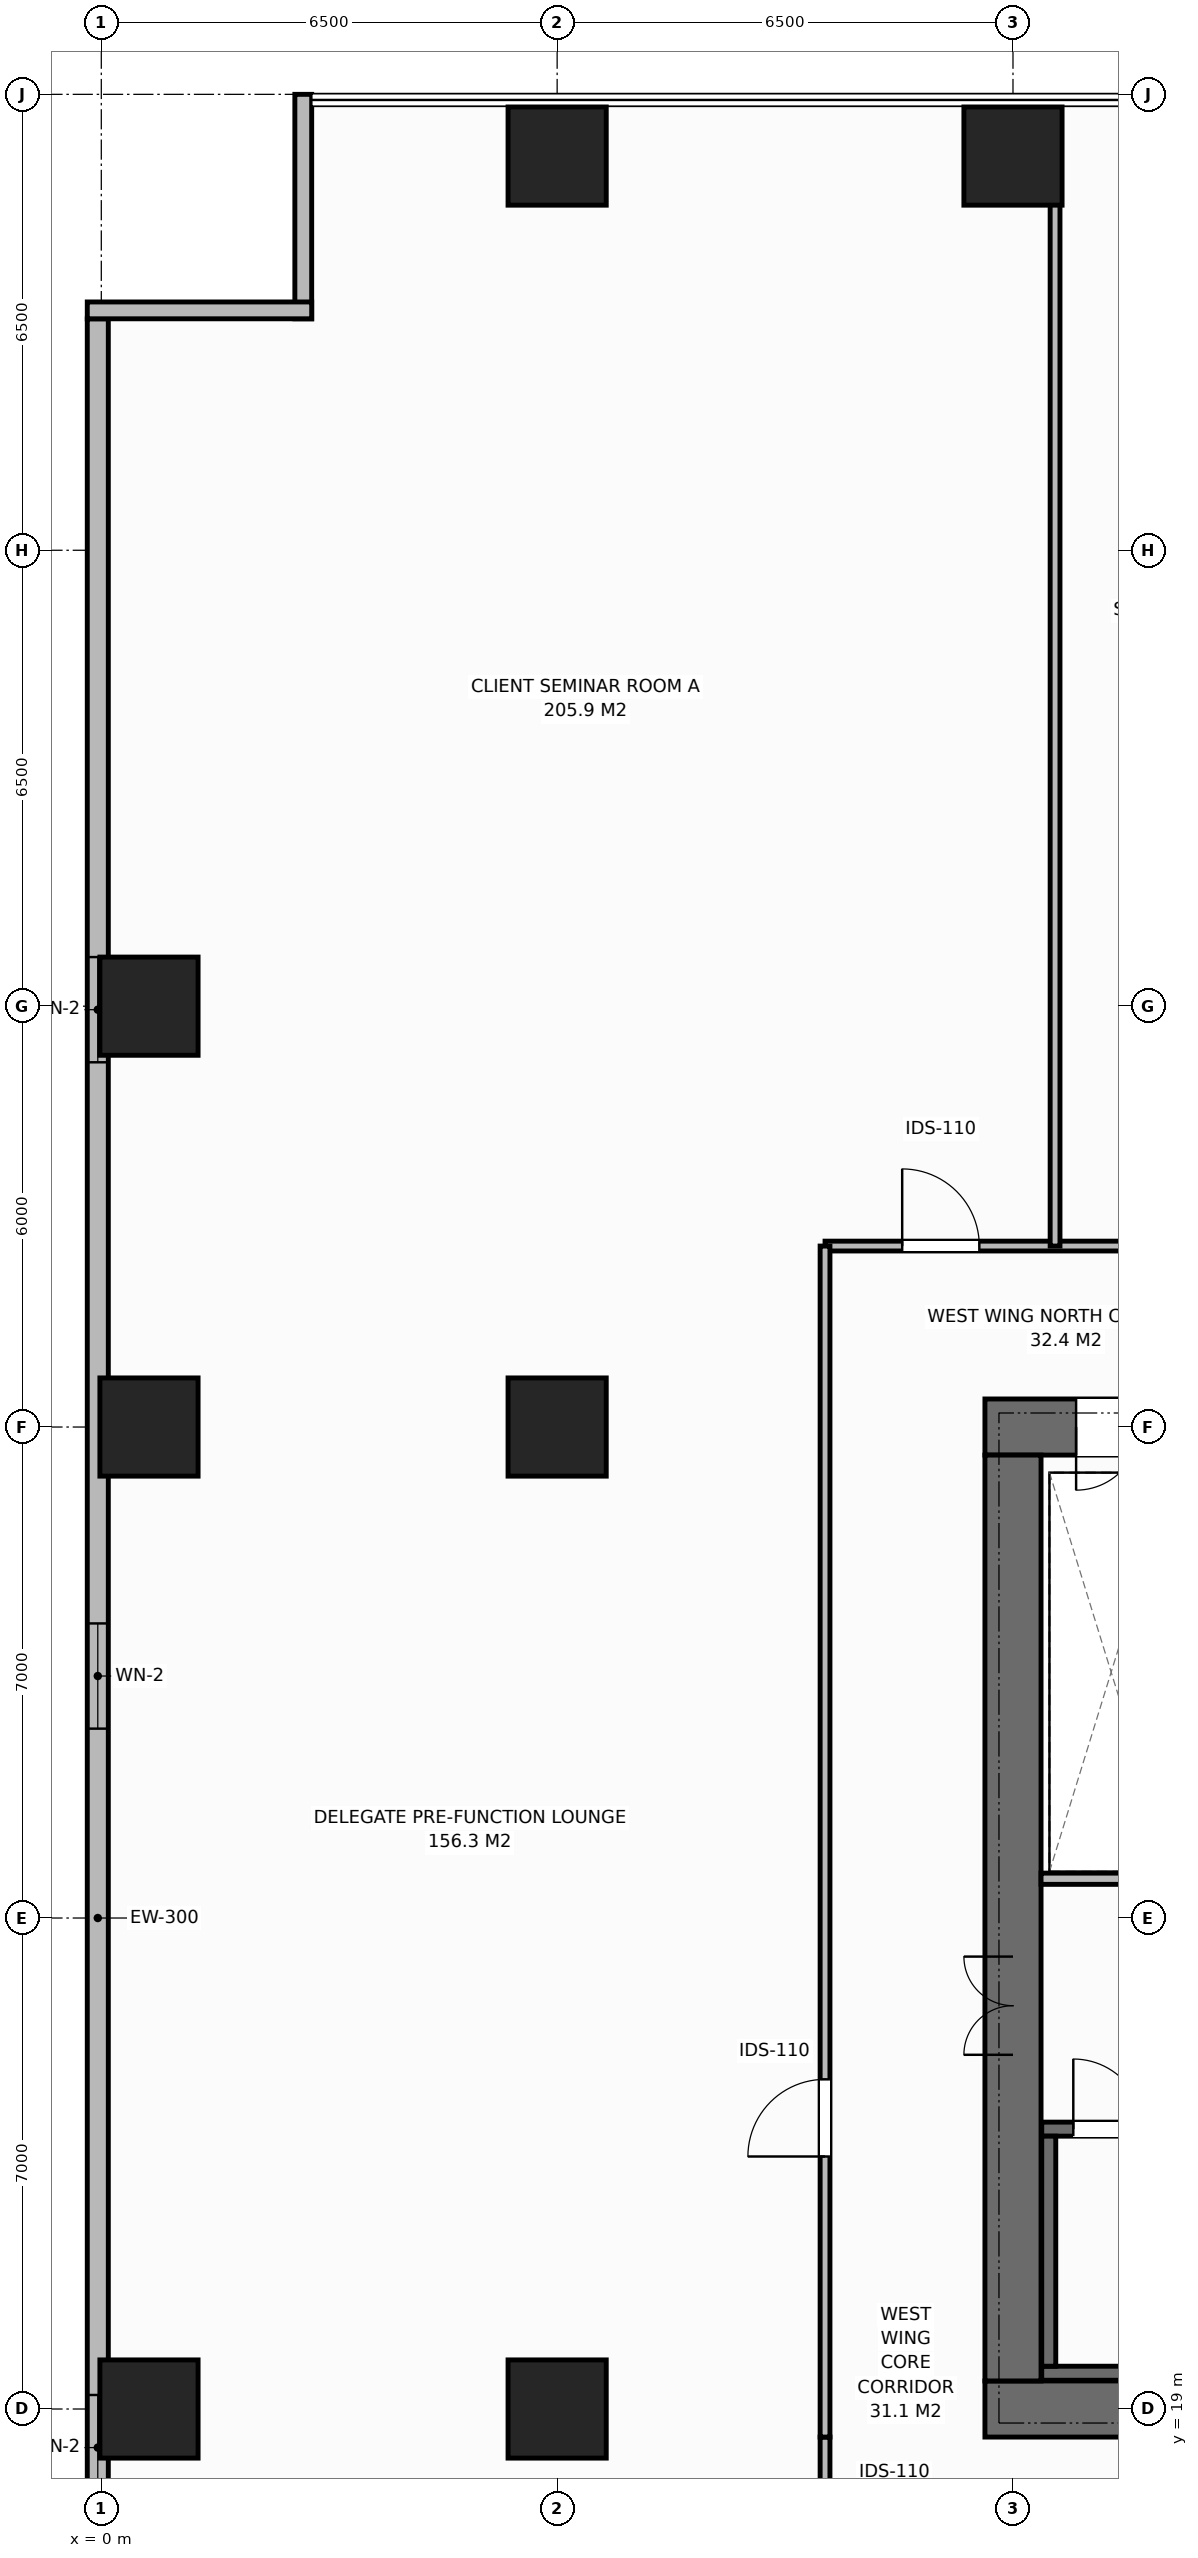
"""IFC4 building model, lengths in metres.
Left out: names, types, materials, properties, quantities, classifications, styles, units other than length and angle.
Written with IfcOpenShell. Run it as: python <this file> out.ifc"""

import sys

from ifc_helpers import new_model, si_unit, direction, frame, frame_2d, origin, origin_2d, place, context, subcontext, project, spatial, rectangle, extrude, element, fill, save


model = new_model("IFC4")
c1 = context("Model", 3, precision=1e-05, world=origin(), true_north=direction((0.0, 1.0)))
c2 = subcontext(c1, "Body", "Model", "MODEL_VIEW")
j1 = project(units=[si_unit("LENGTHUNIT", "METRE"), si_unit("PLANEANGLEUNIT", "RADIAN")], contexts=[c1])
p1 = place(None, origin())
s1 = spatial("IfcSite", under=j1, at=p1, CompositionType="ELEMENT")
p2 = place(p1, origin())
s2 = spatial("IfcBuilding", under=s1, at=p2, CompositionType="ELEMENT")
p3 = place(p2, frame((0.0, 0.0, 6.0)))
s3 = spatial("IfcBuildingStorey", under=s2, at=p3, CompositionType="ELEMENT", Elevation=6.0)
p4 = place(p3, frame((12.6, 19.0, 0.0), z_axis=(0.0, 0.0, 1.0), x_axis=(1.0, 0.0, 0.0)))
e1 = element("IfcWall", 1, at=p4, inside=s3, PredefinedType="SHEAR", context=c2, shape_type="SweptSolid", body=[
    extrude(rectangle(XDim=13.8, YDim=0.8, at=frame_2d((6.9, 0.0))), origin(), (0.0, 0.0, 1.0), 5.5),
])
p5 = place(p4, frame((9.28, 0.0, 0.0)))
e2 = element("IfcOpeningElement", 2, at=p5, cuts=e1, PredefinedType="OPENING", context=c2, shape_type="SweptSolid", body=[
    extrude(rectangle(XDim=1.4, YDim=2.2, at=frame_2d((0.7, 1.1))), frame((0.0, 0.41, 0.0), z_axis=(0.0, -1.0, 0.0), x_axis=(1.0, 0.0, 0.0)), (0.0, 0.0, 1.0), 0.82),
])
p6 = place(p3, frame((12.6, 33.0, 0.0), z_axis=(0.0, 0.0, 1.0), x_axis=(1.0, 0.0, 0.0)))
e3 = element("IfcWall", 3, at=p6, inside=s3, PredefinedType="SHEAR", context=c2, shape_type="SweptSolid", body=[
    extrude(rectangle(XDim=13.8, YDim=0.8, at=frame_2d((6.9, 0.0))), origin(), (0.0, 0.0, 1.0), 5.5),
])
p7 = place(p6, frame((1.3, 0.0, 0.0)))
e4 = element("IfcOpeningElement", 4, at=p7, cuts=e3, PredefinedType="OPENING", context=c2, shape_type="SweptSolid", body=[
    extrude(rectangle(XDim=0.9, YDim=2.15, at=frame_2d((0.45, 1.075))), frame((0.0, 0.41, 0.0), z_axis=(0.0, -1.0, 0.0), x_axis=(1.0, 0.0, 0.0)), (0.0, 0.0, 1.0), 0.82),
])
p8 = place(p6, frame((3.35, 0.0, 0.0)))
e5 = element("IfcOpeningElement", 5, at=p8, cuts=e3, PredefinedType="OPENING", context=c2, shape_type="SweptSolid", body=[
    extrude(rectangle(XDim=0.95, YDim=2.15, at=frame_2d((0.475, 1.075))), frame((0.0, 0.41, 0.0), z_axis=(0.0, -1.0, 0.0), x_axis=(1.0, 0.0, 0.0)), (0.0, 0.0, 1.0), 0.82),
])
p9 = place(p6, frame((6.2, 0.0, 0.0)))
e6 = element("IfcOpeningElement", 6, at=p9, cuts=e3, PredefinedType="OPENING", context=c2, shape_type="SweptSolid", body=[
    extrude(rectangle(XDim=0.95, YDim=2.15, at=frame_2d((0.475, 1.075))), frame((0.0, 0.41, 0.0), z_axis=(0.0, -1.0, 0.0), x_axis=(1.0, 0.0, 0.0)), (0.0, 0.0, 1.0), 0.82),
])
p10 = place(p6, frame((9.28, 0.0, 0.0)))
e7 = element("IfcOpeningElement", 7, at=p10, cuts=e3, PredefinedType="OPENING", context=c2, shape_type="SweptSolid", body=[
    extrude(rectangle(XDim=1.4, YDim=2.2, at=frame_2d((0.7, 1.1))), frame((0.0, 0.41, 0.0), z_axis=(0.0, -1.0, 0.0), x_axis=(1.0, 0.0, 0.0)), (0.0, 0.0, 1.0), 0.82),
])
p11 = place(p3, frame((13.0, 19.4, 0.0), z_axis=(0.0, 0.0, 1.0), x_axis=(0.0, 1.0, 0.0)))
e8 = element("IfcWall", 8, at=p11, inside=s3, PredefinedType="SHEAR", context=c2, shape_type="SweptSolid", body=[
    extrude(rectangle(XDim=13.2, YDim=0.8, at=frame_2d((6.6, 0.0))), origin(), (0.0, 0.0, 1.0), 5.5),
])
p12 = place(p11, frame((4.65, 0.0, 0.0)))
e9 = element("IfcOpeningElement", 9, at=p12, cuts=e8, PredefinedType="OPENING", context=c2, shape_type="SweptSolid", body=[
    extrude(rectangle(XDim=1.4, YDim=2.2, at=frame_2d((0.7, 1.1))), frame((0.0, 0.41, 0.0), z_axis=(0.0, -1.0, 0.0), x_axis=(1.0, 0.0, 0.0)), (0.0, 0.0, 1.0), 0.82),
])
p13 = place(p3, frame((13.41, 19.51, 0.0), z_axis=(0.0, 0.0, 1.0), x_axis=(1.0, 0.0, 0.0)))
e10 = element("IfcWall", 10, at=p13, inside=s3, PredefinedType="SHEAR", context=c2, shape_type="SweptSolid", body=[
    extrude(rectangle(XDim=8.43, YDim=0.2, at=frame_2d((4.215, 0.0))), origin(), (0.0, 0.0, 1.0), 5.5),
])
p14 = place(p3, frame((13.41, 22.99, 0.0), z_axis=(0.0, 0.0, 1.0), x_axis=(1.0, 0.0, 0.0)))
e11 = element("IfcWall", 11, at=p14, inside=s3, PredefinedType="SHEAR", context=c2, shape_type="SweptSolid", body=[
    extrude(rectangle(XDim=8.43, YDim=0.2, at=frame_2d((4.215, 0.0))), origin(), (0.0, 0.0, 1.0), 5.5),
])
p15 = place(p14, frame((0.45, 0.0, 0.0)))
e12 = element("IfcOpeningElement", 12, at=p15, cuts=e11, PredefinedType="OPENING", context=c2, shape_type="SweptSolid", body=[
    extrude(rectangle(XDim=1.0, YDim=2.15, at=frame_2d((0.5, 1.075))), frame((0.0, 0.11, 0.0), z_axis=(0.0, -1.0, 0.0), x_axis=(1.0, 0.0, 0.0)), (0.0, 0.0, 1.0), 0.22),
])
p16 = place(p3, frame((13.51, 19.61, 0.0), z_axis=(0.0, 0.0, 1.0), x_axis=(0.0, 1.0, 0.0)))
e13 = element("IfcWall", 13, at=p16, inside=s3, PredefinedType="SHEAR", context=c2, shape_type="SweptSolid", body=[
    extrude(rectangle(XDim=3.28, YDim=0.2, at=frame_2d((1.64, 0.0))), origin(), (0.0, 0.0, 1.0), 5.5),
])
for number, where, z_axis, x_axis in (
    (14, (6.5, 19.0, 0.0), (0.0, 0.0, 1.0), (1.0, 0.0, 0.0)),
    (15, (6.5, 33.0, 0.0), (0.0, 0.0, 1.0), (1.0, 0.0, 0.0)),
    (16, (6.5, 51.12, 0.0), (0.0, 0.0, 1.0), (1.0, 0.0, 0.0)),
    (17, (13.0, 51.12, 0.0), (0.0, 0.0, 1.0), (1.0, 0.0, 0.0)),
    (18, (0.68, 19.0, 0.0), (0.0, 0.0, 1.0), (1.0, 0.0, 0.0)),
    (19, (0.68, 33.0, 0.0), (0.0, 0.0, 1.0), (1.0, 0.0, 0.0)),
    (20, (0.68, 39.0, 0.0), (0.0, 0.0, 1.0), (1.0, 0.0, 0.0)),
):
    element("IfcColumn", number, at=place(p3, frame(where, z_axis=z_axis, x_axis=x_axis)), inside=s3, PredefinedType="COLUMN", context=c2, shape_type="SweptSolid", body=[
        extrude(rectangle(XDim=1.4, YDim=1.4, at=origin_2d()), origin(), (0.0, 0.0, 1.0), 5.5),
    ])
p17 = place(p3, frame((-0.05, 3.2, 0.0), z_axis=(0.0, 0.0, 1.0), x_axis=(0.0, 1.0, 0.0)))
e21 = element("IfcWall", 21, at=p17, inside=s3, PredefinedType="STANDARD", context=c2, shape_type="SweptSolid", body=[
    extrude(rectangle(XDim=45.6, YDim=0.3, at=frame_2d((22.8, 0.0))), origin(), (0.0, 0.0, 1.0), 5.22),
])
p18 = place(p17, frame((5.0, 0.0, 0.9)))
e22 = element("IfcOpeningElement", 22, at=p18, cuts=e21, PredefinedType="OPENING", context=c2, shape_type="SweptSolid", body=[
    extrude(rectangle(XDim=1.5, YDim=2.2, at=frame_2d((0.75, 1.1))), frame((0.0, 0.16, 0.0), z_axis=(0.0, -1.0, 0.0), x_axis=(1.0, 0.0, 0.0)), (0.0, 0.0, 1.0), 0.32),
])
p19 = place(p17, frame((14.5, 0.0, 0.9)))
e23 = element("IfcOpeningElement", 23, at=p19, cuts=e21, PredefinedType="OPENING", context=c2, shape_type="SweptSolid", body=[
    extrude(rectangle(XDim=1.5, YDim=2.2, at=frame_2d((0.75, 1.1))), frame((0.0, 0.16, 0.0), z_axis=(0.0, -1.0, 0.0), x_axis=(1.0, 0.0, 0.0)), (0.0, 0.0, 1.0), 0.32),
])
p20 = place(p17, frame((25.5, 0.0, 0.9)))
e24 = element("IfcOpeningElement", 24, at=p20, cuts=e21, PredefinedType="OPENING", context=c2, shape_type="SweptSolid", body=[
    extrude(rectangle(XDim=1.5, YDim=2.2, at=frame_2d((0.75, 1.1))), frame((0.0, 0.16, 0.0), z_axis=(0.0, -1.0, 0.0), x_axis=(1.0, 0.0, 0.0)), (0.0, 0.0, 1.0), 0.32),
])
p21 = place(p17, frame((35.0, 0.0, 0.9)))
e25 = element("IfcOpeningElement", 25, at=p21, cuts=e21, PredefinedType="OPENING", context=c2, shape_type="SweptSolid", body=[
    extrude(rectangle(XDim=1.5, YDim=2.2, at=frame_2d((0.75, 1.1))), frame((0.0, 0.16, 0.0), z_axis=(0.0, -1.0, 0.0), x_axis=(1.0, 0.0, 0.0)), (0.0, 0.0, 1.0), 0.32),
])
for number, where, z_axis, x_axis in (
    (26, (2.88, 48.8, 0.0), (0.0, 0.0, 1.0), (0.0, 1.0, 0.0)),
    (27, (-0.2, 48.92, 0.0), (0.0, 0.0, 1.0), (1.0, 0.0, 0.0)),
):
    element("IfcWall", number, at=place(p3, frame(where, z_axis=z_axis, x_axis=x_axis)), inside=s3, PredefinedType="STANDARD", context=c2, shape_type="SweptSolid", body=[
        extrude(rectangle(XDim=3.2, YDim=0.24, at=frame_2d((1.6, 0.0))), origin(), (0.0, 0.0, 1.0), 5.22),
    ])
p22 = place(p3, frame((13.4, 26.56, 0.0), z_axis=(0.0, 0.0, 1.0), x_axis=(1.0, 0.0, 0.0)))
e28 = element("IfcWall", 28, at=p22, inside=s3, PredefinedType="STANDARD", context=c2, shape_type="SweptSolid", body=[
    extrude(rectangle(XDim=8.34, YDim=0.16, at=frame_2d((4.17, 0.0))), origin(), (0.0, 0.0, 1.0), 5.22),
])
p23 = place(p3, frame((10.32, 35.58, 0.0), z_axis=(0.0, 0.0, 1.0), x_axis=(1.0, 0.0, 0.0)))
e29 = element("IfcWall", 29, at=p23, inside=s3, PredefinedType="PARTITIONING", context=c2, shape_type="SweptSolid", body=[
    extrude(rectangle(XDim=15.6, YDim=0.14, at=frame_2d((7.8, 0.0))), origin(), (0.0, 0.0, 1.0), 5.22),
])
p24 = place(p23, frame((10.78, 0.0, 0.0)))
e30 = element("IfcOpeningElement", 30, at=p24, cuts=e29, PredefinedType="OPENING", context=c2, shape_type="SweptSolid", body=[
    extrude(rectangle(XDim=0.9, YDim=2.15, at=frame_2d((0.45, 1.075))), frame((0.0, 0.08, 0.0), z_axis=(0.0, -1.0, 0.0), x_axis=(1.0, 0.0, 0.0)), (0.0, 0.0, 1.0), 0.16),
])
p25 = place(p23, frame((13.63, 0.0, 0.0)))
e31 = element("IfcOpeningElement", 31, at=p25, cuts=e29, PredefinedType="OPENING", context=c2, shape_type="SweptSolid", body=[
    extrude(rectangle(XDim=0.9, YDim=2.15, at=frame_2d((0.45, 1.075))), frame((0.0, 0.08, 0.0), z_axis=(0.0, -1.0, 0.0), x_axis=(1.0, 0.0, 0.0)), (0.0, 0.0, 1.0), 0.16),
])
p26 = place(p23, frame((1.1, 0.0, 0.0)))
e32 = element("IfcOpeningElement", 32, at=p26, cuts=e29, PredefinedType="OPENING", context=c2, shape_type="SweptSolid", body=[
    extrude(rectangle(XDim=1.1, YDim=2.15, at=frame_2d((0.55, 1.075))), frame((0.0, 0.08, 0.0), z_axis=(0.0, -1.0, 0.0), x_axis=(1.0, 0.0, 0.0)), (0.0, 0.0, 1.0), 0.16),
])
p27 = place(p23, frame((4.6, 0.0, 0.0)))
e33 = element("IfcOpeningElement", 33, at=p27, cuts=e29, PredefinedType="OPENING", context=c2, shape_type="SweptSolid", body=[
    extrude(rectangle(XDim=1.1, YDim=2.15, at=frame_2d((0.55, 1.075))), frame((0.0, 0.08, 0.0), z_axis=(0.0, -1.0, 0.0), x_axis=(1.0, 0.0, 0.0)), (0.0, 0.0, 1.0), 0.16),
])
p28 = place(p23, frame((7.8, 0.0, 0.0)))
e34 = element("IfcOpeningElement", 34, at=p28, cuts=e29, PredefinedType="OPENING", context=c2, shape_type="SweptSolid", body=[
    extrude(rectangle(XDim=0.95, YDim=2.15, at=frame_2d((0.475, 1.075))), frame((0.0, 0.08, 0.0), z_axis=(0.0, -1.0, 0.0), x_axis=(1.0, 0.0, 0.0)), (0.0, 0.0, 1.0), 0.16),
])
p29 = place(p3, frame((10.32, 16.42, 0.0), z_axis=(0.0, 0.0, 1.0), x_axis=(0.0, 1.0, 0.0)))
e35 = element("IfcWall", 35, at=p29, inside=s3, PredefinedType="PARTITIONING", context=c2, shape_type="SweptSolid", body=[
    extrude(rectangle(XDim=2.18, YDim=0.14, at=frame_2d((1.09, 0.0))), origin(), (0.0, 0.0, 1.0), 5.22),
])
p30 = place(p3, frame((13.6, 35.58, 0.0), z_axis=(0.0, 0.0, 1.0), x_axis=(0.0, 1.0, 0.0)))
e36 = element("IfcWall", 36, at=p30, inside=s3, PredefinedType="PARTITIONING", context=c2, shape_type="SweptSolid", body=[
    extrude(rectangle(XDim=16.36, YDim=0.14, at=frame_2d((8.18, 0.0))), origin(), (0.0, 0.0, 1.0), 5.22),
])
p31 = place(p3, frame((10.32, 18.6, 0.0), z_axis=(0.0, 0.0, 1.0), x_axis=(0.0, 1.0, 0.0)))
e37 = element("IfcWall", 37, at=p31, inside=s3, PredefinedType="PARTITIONING", context=c2, shape_type="SweptSolid", body=[
    extrude(rectangle(XDim=16.98, YDim=0.14, at=frame_2d((8.49, 0.0))), origin(), (0.0, 0.0, 1.0), 5.22),
])
p32 = place(p31, frame((4.0, 0.0, 0.0)))
e38 = element("IfcOpeningElement", 38, at=p32, cuts=e37, PredefinedType="OPENING", context=c2, shape_type="SweptSolid", body=[
    extrude(rectangle(XDim=1.1, YDim=2.15, at=frame_2d((0.55, 1.075))), frame((0.0, 0.08, 0.0), z_axis=(0.0, -1.0, 0.0), x_axis=(1.0, 0.0, 0.0)), (0.0, 0.0, 1.0), 0.16),
])
p33 = place(p19, origin())
e39 = element("IfcWindow", 39, at=p33, inside=s3, PartitioningType="SINGLE_PANEL", PredefinedType="WINDOW", context=c2, shape_type="SweptSolid", body=[
    extrude(rectangle(XDim=1.5, YDim=2.2, at=frame_2d((0.75, 1.1))), frame((0.0, 0.03, 0.0), z_axis=(0.0, -1.0, 0.0), x_axis=(1.0, 0.0, 0.0)), (0.0, 0.0, 1.0), 0.06),
])
fill(e23, e39)
p34 = place(p20, origin())
e40 = element("IfcWindow", 40, at=p34, inside=s3, PartitioningType="SINGLE_PANEL", PredefinedType="WINDOW", context=c2, shape_type="SweptSolid", body=[
    extrude(rectangle(XDim=1.5, YDim=2.2, at=frame_2d((0.75, 1.1))), frame((0.0, 0.03, 0.0), z_axis=(0.0, -1.0, 0.0), x_axis=(1.0, 0.0, 0.0)), (0.0, 0.0, 1.0), 0.06),
])
fill(e24, e40)
p35 = place(p21, origin())
e41 = element("IfcWindow", 41, at=p35, inside=s3, PartitioningType="SINGLE_PANEL", PredefinedType="WINDOW", context=c2, shape_type="SweptSolid", body=[
    extrude(rectangle(XDim=1.5, YDim=2.2, at=frame_2d((0.75, 1.1))), frame((0.0, 0.03, 0.0), z_axis=(0.0, -1.0, 0.0), x_axis=(1.0, 0.0, 0.0)), (0.0, 0.0, 1.0), 0.06),
])
fill(e25, e41)
p36 = place(p15, origin())
e42 = element("IfcDoor", 42, at=p36, inside=s3, OperationType="SINGLE_SWING_LEFT", PredefinedType="DOOR", context=c2, shape_type="SweptSolid", body=[
    extrude(rectangle(XDim=1.0, YDim=2.15, at=frame_2d((0.5, 1.075))), frame((0.0, 0.025, 0.0), z_axis=(0.0, -1.0, 0.0), x_axis=(1.0, 0.0, 0.0)), (0.0, 0.0, 1.0), 0.05),
])
fill(e12, e42)
p37 = place(p12, origin())
e43 = element("IfcDoor", 43, at=p37, inside=s3, OperationType="DOUBLE_DOOR_SINGLE_SWING", PredefinedType="DOOR", context=c2, shape_type="SweptSolid", body=[
    extrude(rectangle(XDim=1.4, YDim=2.2, at=frame_2d((0.7, 1.1))), frame((0.0, 0.025, 0.0), z_axis=(0.0, -1.0, 0.0), x_axis=(1.0, 0.0, 0.0)), (0.0, 0.0, 1.0), 0.05),
])
fill(e9, e43)
p38 = place(p7, origin())
e44 = element("IfcDoor", 44, at=p38, inside=s3, OperationType="SINGLE_SWING_RIGHT", PredefinedType="DOOR", context=c2, shape_type="SweptSolid", body=[
    extrude(rectangle(XDim=0.9, YDim=2.15, at=frame_2d((0.45, 1.075))), frame((0.0, -0.075, 0.0), z_axis=(0.0, -1.0, 0.0), x_axis=(1.0, 0.0, 0.0)), (0.0, 0.0, 1.0), 0.05),
])
fill(e4, e44)
p39 = place(p26, origin())
e45 = element("IfcDoor", 45, at=p39, inside=s3, OperationType="SINGLE_SWING_LEFT", PredefinedType="DOOR", context=c2, shape_type="SweptSolid", body=[
    extrude(rectangle(XDim=1.1, YDim=2.15, at=frame_2d((0.55, 1.075))), frame((0.0, 0.025, 0.0), z_axis=(0.0, -1.0, 0.0), x_axis=(1.0, 0.0, 0.0)), (0.0, 0.0, 1.0), 0.05),
])
fill(e32, e45)
p40 = place(p32, origin())
e46 = element("IfcDoor", 46, at=p40, inside=s3, OperationType="SINGLE_SWING_LEFT", PredefinedType="DOOR", context=c2, shape_type="SweptSolid", body=[
    extrude(rectangle(XDim=1.1, YDim=2.15, at=frame_2d((0.55, 1.075))), frame((0.0, 0.025, 0.0), z_axis=(0.0, -1.0, 0.0), x_axis=(1.0, 0.0, 0.0)), (0.0, 0.0, 1.0), 0.05),
])
fill(e38, e46)
save(model, sys.argv[1])
